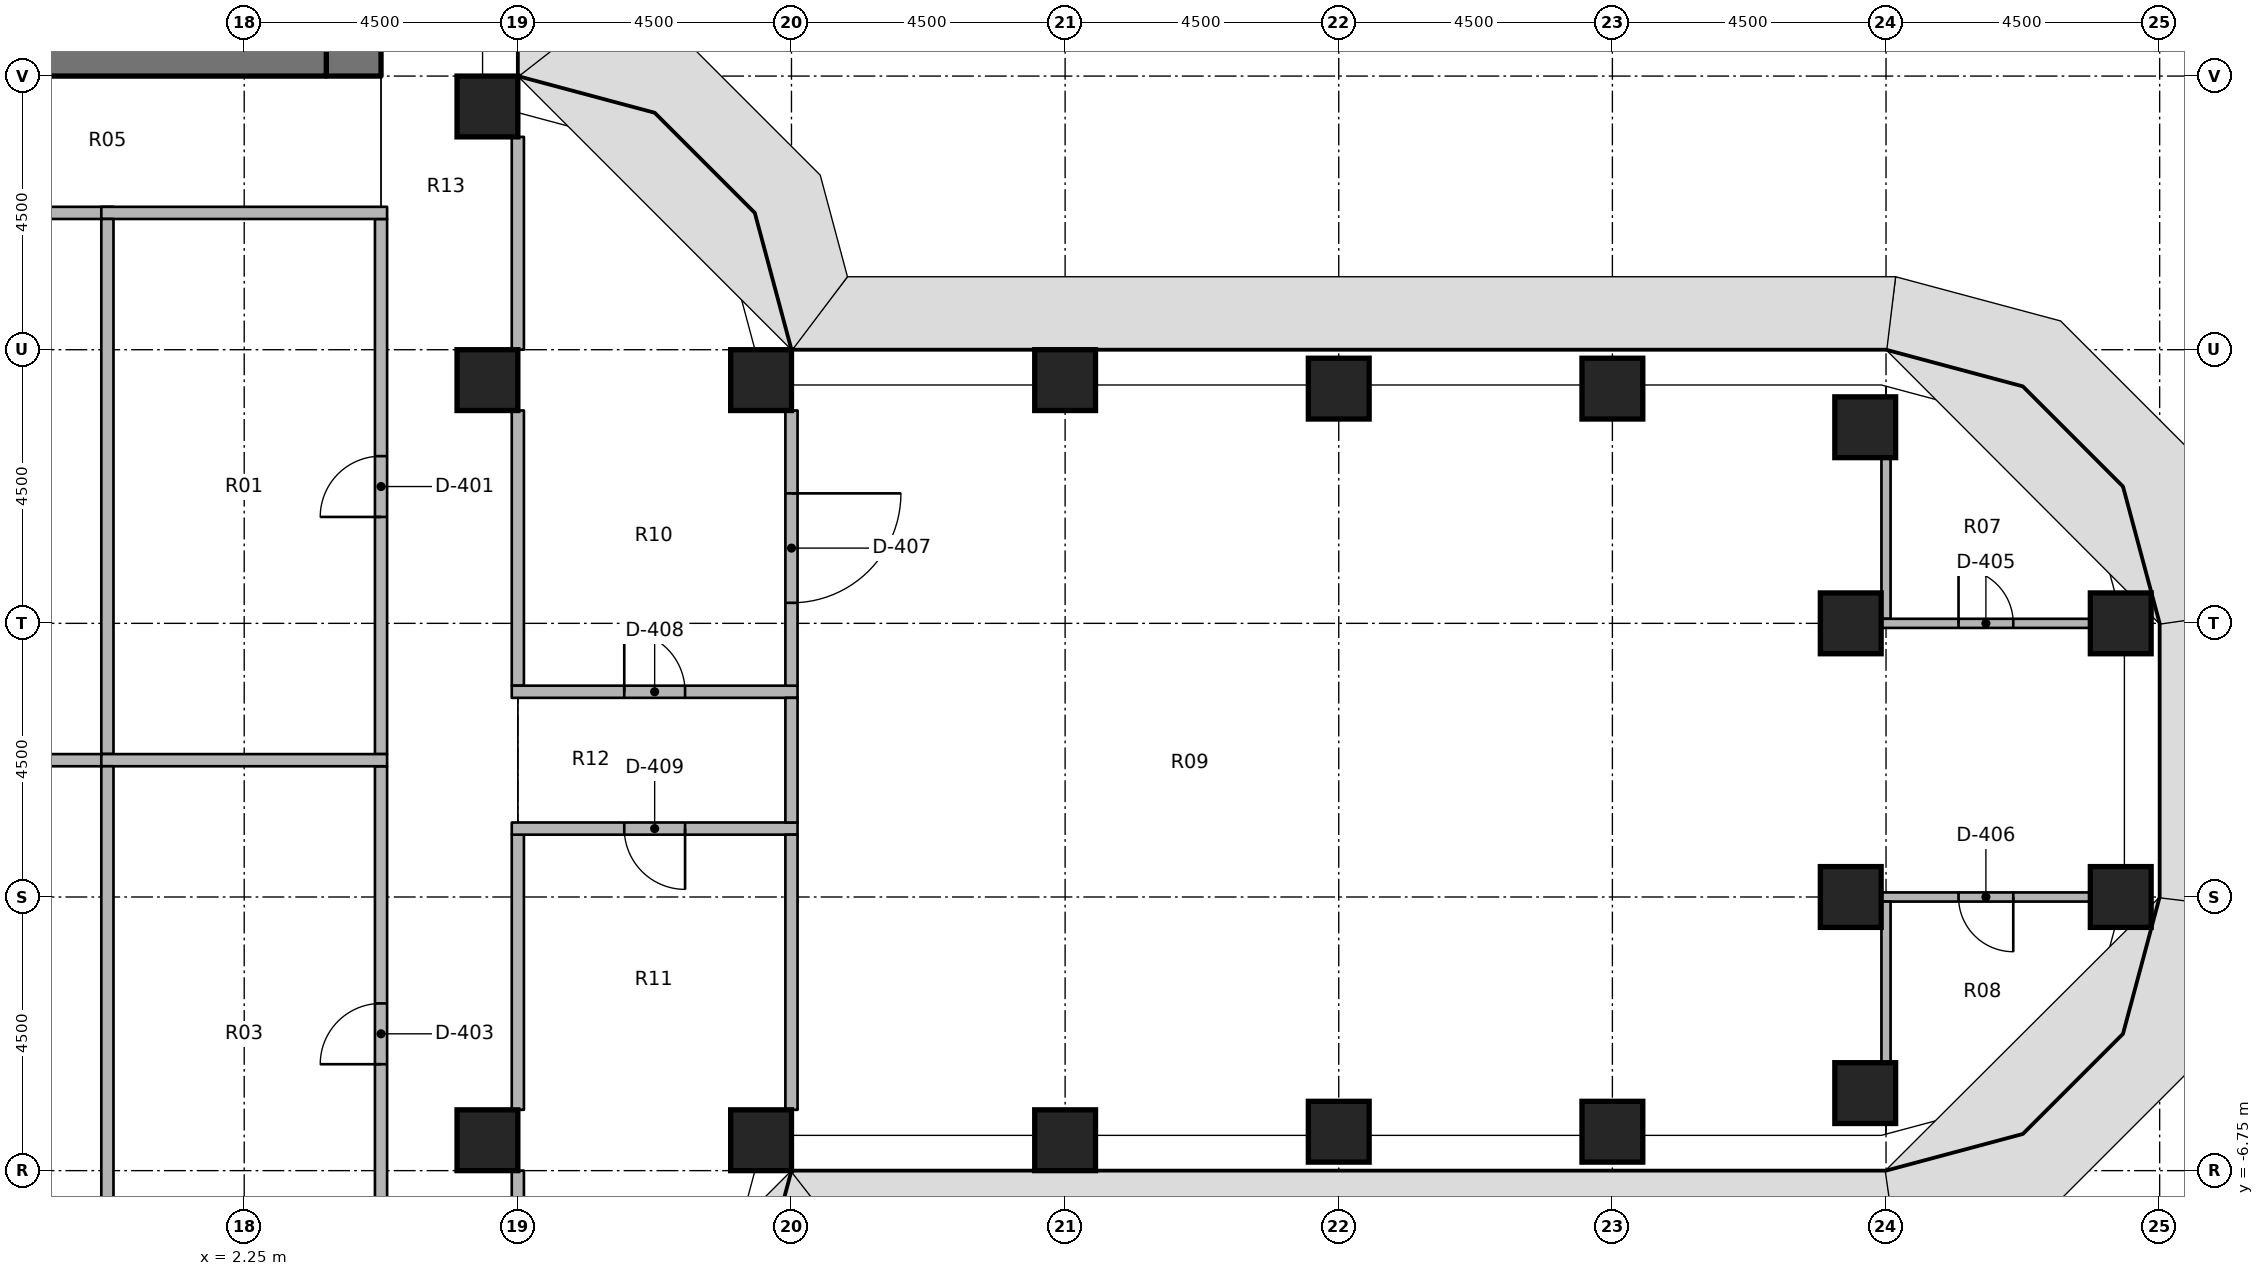
"""IFC4 building model, lengths in metres.
Left out: names, types, materials, properties, quantities, classifications, styles, units other than length and angle.
Written with IfcOpenShell. Run it as: python <this file> out.ifc"""

import sys

from ifc_helpers import new_model, si_unit, direction, frame, frame_2d, origin, origin_2d, place, context, subcontext, project, spatial, rectangle, extrude, element, fill, save


model = new_model("IFC4")
c1 = context("Model", 3, precision=1e-05, world=origin(), true_north=direction((0.0, 1.0)))
c2 = subcontext(c1, "Body", "Model", "MODEL_VIEW")
j1 = project(units=[si_unit("LENGTHUNIT", "METRE"), si_unit("PLANEANGLEUNIT", "RADIAN")], contexts=[c1])
p1 = place(None, origin())
s1 = spatial("IfcSite", under=j1, at=p1, CompositionType="ELEMENT")
p2 = place(p1, origin())
s2 = spatial("IfcBuilding", under=s1, at=p2, CompositionType="ELEMENT")
p3 = place(p2, frame((0.0, 0.0, 56.4)))
s3 = spatial("IfcBuildingStorey", under=s2, at=p3, CompositionType="ELEMENT", Elevation=56.4)
for number, where, z_axis, x_axis in (
    (1, (6.25, -6.25, 0.0), (0.0, 0.0, 1.0), (1.0, 0.0, 0.0)),
    (2, (6.25, 6.25, 0.0), (0.0, 0.0, 1.0), (1.0, 0.0, 0.0)),
    (3, (6.25, 10.75, 0.0), (0.0, 0.0, 1.0), (1.0, 0.0, 0.0)),
    (4, (10.75, -6.25, 0.0), (0.0, 0.0, 1.0), (1.0, 0.0, 0.0)),
    (5, (10.75, 6.25, 0.0), (0.0, 0.0, 1.0), (1.0, 0.0, 0.0)),
    (6, (15.75, -6.25, 0.0), (0.0, 0.0, 1.0), (1.0, 0.0, 0.0)),
    (7, (15.75, 6.25, 0.0), (0.0, 0.0, 1.0), (1.0, 0.0, 0.0)),
    (8, (20.25, -6.11, 0.0), (0.0, 0.0, 1.0), (1.0, 0.0, 0.0)),
    (9, (20.25, 6.11, 0.0), (0.0, 0.0, 1.0), (1.0, 0.0, 0.0)),
    (10, (24.75, -6.11, 0.0), (0.0, 0.0, 1.0), (1.0, 0.0, 0.0)),
    (11, (24.75, 6.11, 0.0), (0.0, 0.0, 1.0), (1.0, 0.0, 0.0)),
    (12, (28.908, -5.475, 0.0), (0.0, 0.0, 1.0), (1.0, 0.0, 0.0)),
    (13, (28.67, -2.25, 0.0), (0.0, 0.0, 1.0), (1.0, 0.0, 0.0)),
    (14, (28.67, 2.25, 0.0), (0.0, 0.0, 1.0), (1.0, 0.0, 0.0)),
    (15, (28.908, 5.475, 0.0), (0.0, 0.0, 1.0), (1.0, 0.0, 0.0)),
    (16, (33.11, -2.25, 0.0), (0.0, 0.0, 1.0), (1.0, 0.0, 0.0)),
    (17, (33.11, 2.25, 0.0), (0.0, 0.0, 1.0), (1.0, 0.0, 0.0)),
):
    element("IfcColumn", number, at=place(p3, frame(where, z_axis=z_axis, x_axis=x_axis)), inside=s3, PredefinedType="COLUMN", context=c2, shape_type="SweptSolid", body=[
        extrude(rectangle(XDim=1.0, YDim=1.0, at=origin_2d()), origin(), (0.0, 0.0, 1.0), 4.05),
    ])
p4 = place(p3, frame((4.05, 11.25, 0.0), z_axis=(0.0, 0.0, 1.0), x_axis=(0.0, 1.0, 0.0)))
e18 = element("IfcWall", 18, at=p4, inside=s3, PredefinedType="SHEAR", context=c2, shape_type="SweptSolid", body=[
    extrude(rectangle(XDim=15.0, YDim=0.9, at=frame_2d((7.5, 0.0))), origin(), (0.0, 0.0, 1.0), 4.2),
])
p5 = place(p4, frame((7.15, 0.0, 0.0)))
e19 = element("IfcOpeningElement", 19, at=p5, cuts=e18, PredefinedType="OPENING", context=c2, shape_type="SweptSolid", body=[
    extrude(rectangle(XDim=1.5, YDim=2.3, at=frame_2d((0.75, 1.15))), frame((0.0, 0.46, 0.0), z_axis=(0.0, -1.0, 0.0), x_axis=(1.0, 0.0, 0.0)), (0.0, 0.0, 1.0), 0.92),
])
p6 = place(p4, frame((5.55, 0.0, 0.0)))
e20 = element("IfcOpeningElement", 20, at=p6, cuts=e18, PredefinedType="OPENING", context=c2, shape_type="SweptSolid", body=[
    extrude(rectangle(XDim=1.2, YDim=2.1, at=frame_2d((0.6, 1.05))), frame((0.0, 0.46, 0.0), z_axis=(0.0, -1.0, 0.0), x_axis=(1.0, 0.0, 0.0)), (0.0, 0.0, 1.0), 0.92),
])
p7 = place(p3, frame((-3.6, 11.7, 0.0), z_axis=(0.0, 0.0, 1.0), x_axis=(1.0, 0.0, 0.0)))
e21 = element("IfcWall", 21, at=p7, inside=s3, PredefinedType="SHEAR", context=c2, shape_type="SweptSolid", body=[
    extrude(rectangle(XDim=7.2, YDim=0.9, at=frame_2d((3.6, 0.0))), origin(), (0.0, 0.0, 1.0), 4.2),
])
p8 = place(p3, frame((4.5, 0.1, 0.0), z_axis=(0.0, 0.0, 1.0), x_axis=(0.0, 1.0, 0.0)))
e22 = element("IfcWall", 22, at=p8, inside=s3, PredefinedType="PARTITIONING", context=c2, shape_type="SweptSolid", body=[
    extrude(rectangle(XDim=8.8, YDim=0.2, at=frame_2d((4.4, 0.0))), origin(), (0.0, 0.0, 1.0), 3.131),
])
p9 = place(p8, frame((3.9, 0.0, 0.0)))
e23 = element("IfcOpeningElement", 23, at=p9, cuts=e22, PredefinedType="OPENING", context=c2, shape_type="SweptSolid", body=[
    extrude(rectangle(XDim=1.0, YDim=2.1, at=frame_2d((0.5, 1.05))), frame((0.0, 0.11, 0.0), z_axis=(0.0, -1.0, 0.0), x_axis=(1.0, 0.0, 0.0)), (0.0, 0.0, 1.0), 0.22),
])
p10 = place(p3, frame((4.5, -8.9, 0.0), z_axis=(0.0, 0.0, 1.0), x_axis=(0.0, 1.0, 0.0)))
e24 = element("IfcWall", 24, at=p10, inside=s3, PredefinedType="PARTITIONING", context=c2, shape_type="SweptSolid", body=[
    extrude(rectangle(XDim=8.8, YDim=0.2, at=frame_2d((4.4, 0.0))), origin(), (0.0, 0.0, 1.0), 3.131),
])
p11 = place(p10, frame((3.9, 0.0, 0.0)))
e25 = element("IfcOpeningElement", 25, at=p11, cuts=e24, PredefinedType="OPENING", context=c2, shape_type="SweptSolid", body=[
    extrude(rectangle(XDim=1.0, YDim=2.1, at=frame_2d((0.5, 1.05))), frame((0.0, 0.11, 0.0), z_axis=(0.0, -1.0, 0.0), x_axis=(1.0, 0.0, 0.0)), (0.0, 0.0, 1.0), 0.22),
])
p12 = place(p3, frame((6.75, 1.225, 0.0), z_axis=(0.0, 0.0, 1.0), x_axis=(0.0, 1.0, 0.0)))
e26 = element("IfcWall", 26, at=p12, inside=s3, PredefinedType="PARTITIONING", context=c2, shape_type="SweptSolid", body=[
    extrude(rectangle(XDim=4.525, YDim=0.2, at=frame_2d((2.262, 0.0))), origin(), (0.0, 0.0, 1.0), 3.131),
])
for number, where, z_axis, x_axis in (
    (27, (6.75, 6.75, 0.0), (0.0, 0.0, 1.0), (0.0, 1.0, 0.0)),
    (28, (6.75, -10.25, 0.0), (0.0, 0.0, 1.0), (0.0, 1.0, 0.0)),
):
    element("IfcWall", number, at=place(p3, frame(where, z_axis=z_axis, x_axis=x_axis)), inside=s3, PredefinedType="PARTITIONING", context=c2, shape_type="SweptSolid", body=[
        extrude(rectangle(XDim=3.5, YDim=0.2, at=frame_2d((1.75, 0.0))), origin(), (0.0, 0.0, 1.0), 3.131),
    ])
p13 = place(p3, frame((6.75, -5.75, 0.0), z_axis=(0.0, 0.0, 1.0), x_axis=(0.0, 1.0, 0.0)))
e29 = element("IfcWall", 29, at=p13, inside=s3, PredefinedType="PARTITIONING", context=c2, shape_type="SweptSolid", body=[
    extrude(rectangle(XDim=4.525, YDim=0.2, at=frame_2d((2.262, 0.0))), origin(), (0.0, 0.0, 1.0), 3.131),
])
for number, where, z_axis, x_axis in (
    (30, (-4.6, 9.0, 0.0), (0.0, 0.0, 1.0), (1.0, 0.0, 0.0)),
    (31, (-0.1, 9.0, 0.0), (0.0, 0.0, 1.0), (1.0, 0.0, 0.0)),
):
    element("IfcWall", number, at=place(p3, frame(where, z_axis=z_axis, x_axis=x_axis)), inside=s3, PredefinedType="PARTITIONING", context=c2, shape_type="SweptSolid", body=[
        extrude(rectangle(XDim=4.7, YDim=0.2, at=frame_2d((2.35, 0.0))), origin(), (0.0, 0.0, 1.0), 3.131),
    ])
p14 = place(p3, frame((0.0, 0.1, 0.0), z_axis=(0.0, 0.0, 1.0), x_axis=(0.0, 1.0, 0.0)))
e32 = element("IfcWall", 32, at=p14, inside=s3, PredefinedType="PARTITIONING", context=c2, shape_type="SweptSolid", body=[
    extrude(rectangle(XDim=8.8, YDim=0.2, at=frame_2d((4.4, 0.0))), origin(), (0.0, 0.0, 1.0), 3.131),
])
for number, where, z_axis, x_axis in (
    (33, (-4.6, 0.0, 0.0), (0.0, 0.0, 1.0), (1.0, 0.0, 0.0)),
    (34, (-0.1, 0.0, 0.0), (0.0, 0.0, 1.0), (1.0, 0.0, 0.0)),
):
    element("IfcWall", number, at=place(p3, frame(where, z_axis=z_axis, x_axis=x_axis)), inside=s3, PredefinedType="PARTITIONING", context=c2, shape_type="SweptSolid", body=[
        extrude(rectangle(XDim=4.7, YDim=0.2, at=frame_2d((2.35, 0.0))), origin(), (0.0, 0.0, 1.0), 3.131),
    ])
p15 = place(p3, frame((0.0, -8.9, 0.0), z_axis=(0.0, 0.0, 1.0), x_axis=(0.0, 1.0, 0.0)))
e35 = element("IfcWall", 35, at=p15, inside=s3, PredefinedType="PARTITIONING", context=c2, shape_type="SweptSolid", body=[
    extrude(rectangle(XDim=8.8, YDim=0.2, at=frame_2d((4.4, 0.0))), origin(), (0.0, 0.0, 1.0), 3.131),
])
p16 = place(p3, frame((6.65, 1.125, 0.0), z_axis=(0.0, 0.0, 1.0), x_axis=(1.0, 0.0, 0.0)))
e36 = element("IfcWall", 36, at=p16, inside=s3, PredefinedType="PARTITIONING", context=c2, shape_type="SweptSolid", body=[
    extrude(rectangle(XDim=4.7, YDim=0.2, at=frame_2d((2.35, 0.0))), origin(), (0.0, 0.0, 1.0), 3.131),
])
p17 = place(p16, frame((1.85, 0.0, 0.0)))
e37 = element("IfcOpeningElement", 37, at=p17, cuts=e36, PredefinedType="OPENING", context=c2, shape_type="SweptSolid", body=[
    extrude(rectangle(XDim=1.0, YDim=2.1, at=frame_2d((0.5, 1.05))), frame((0.0, 0.11, 0.0), z_axis=(0.0, -1.0, 0.0), x_axis=(1.0, 0.0, 0.0)), (0.0, 0.0, 1.0), 0.22),
])
p18 = place(p3, frame((11.35, -1.125, 0.0), z_axis=(0.0, 0.0, 1.0), x_axis=(-1.0, 0.0, 0.0)))
e38 = element("IfcWall", 38, at=p18, inside=s3, PredefinedType="PARTITIONING", context=c2, shape_type="SweptSolid", body=[
    extrude(rectangle(XDim=4.7, YDim=0.2, at=frame_2d((2.35, 0.0))), origin(), (0.0, 0.0, 1.0), 3.131),
])
p19 = place(p18, frame((1.85, 0.0, 0.0)))
e39 = element("IfcOpeningElement", 39, at=p19, cuts=e38, PredefinedType="OPENING", context=c2, shape_type="SweptSolid", body=[
    extrude(rectangle(XDim=1.0, YDim=2.1, at=frame_2d((0.5, 1.05))), frame((0.0, 0.11, 0.0), z_axis=(0.0, -1.0, 0.0), x_axis=(1.0, 0.0, 0.0)), (0.0, 0.0, 1.0), 0.22),
])
p20 = place(p3, frame((11.25, -1.025, 0.0), z_axis=(0.0, 0.0, 1.0), x_axis=(0.0, 1.0, 0.0)))
e40 = element("IfcWall", 40, at=p20, inside=s3, PredefinedType="PARTITIONING", context=c2, shape_type="SweptSolid", body=[
    extrude(rectangle(XDim=2.05, YDim=0.2, at=frame_2d((1.025, 0.0))), origin(), (0.0, 0.0, 1.0), 3.131),
])
p21 = place(p3, frame((11.25, 5.75, 0.0), z_axis=(0.0, 0.0, 1.0), x_axis=(0.0, -1.0, 0.0)))
e41 = element("IfcWall", 41, at=p21, inside=s3, PredefinedType="PARTITIONING", context=c2, shape_type="SweptSolid", body=[
    extrude(rectangle(XDim=4.525, YDim=0.2, at=frame_2d((2.262, 0.0))), origin(), (0.0, 0.0, 1.0), 3.131),
])
p22 = place(p21, frame((1.363, 0.0, 0.0)))
e42 = element("IfcOpeningElement", 42, at=p22, cuts=e41, PredefinedType="OPENING", context=c2, shape_type="SweptSolid", body=[
    extrude(rectangle(XDim=1.8, YDim=2.1, at=frame_2d((0.9, 1.05))), frame((0.0, 0.11, 0.0), z_axis=(0.0, -1.0, 0.0), x_axis=(1.0, 0.0, 0.0)), (0.0, 0.0, 1.0), 0.22),
])
p23 = place(p3, frame((11.25, -5.75, 0.0), z_axis=(0.0, 0.0, 1.0), x_axis=(0.0, 1.0, 0.0)))
e43 = element("IfcWall", 43, at=p23, inside=s3, PredefinedType="PARTITIONING", context=c2, shape_type="SweptSolid", body=[
    extrude(rectangle(XDim=4.525, YDim=0.2, at=frame_2d((2.262, 0.0))), origin(), (0.0, 0.0, 1.0), 3.131),
])
p24 = place(p3, frame((29.25, 2.325, 0.0), z_axis=(0.0, 0.0, 1.0), x_axis=(0.0, 1.0, 0.0)))
e44 = element("IfcWall", 44, at=p24, inside=s3, PredefinedType="PARTITIONING", context=c2, shape_type="SweptSolid", body=[
    extrude(rectangle(XDim=2.65, YDim=0.15, at=frame_2d((1.325, 0.0))), origin(), (0.0, 0.0, 1.0), 3.131),
])
p25 = place(p3, frame((29.175, 2.25, 0.0), z_axis=(0.0, 0.0, 1.0), x_axis=(1.0, 0.0, 0.0)))
e45 = element("IfcWall", 45, at=p25, inside=s3, PredefinedType="PARTITIONING", context=c2, shape_type="SweptSolid", body=[
    extrude(rectangle(XDim=3.435, YDim=0.15, at=frame_2d((1.718, 0.0))), origin(), (0.0, 0.0, 1.0), 3.131),
])
p26 = place(p25, frame((1.268, 0.0, 0.0)))
e46 = element("IfcOpeningElement", 46, at=p26, cuts=e45, PredefinedType="OPENING", context=c2, shape_type="SweptSolid", body=[
    extrude(rectangle(XDim=0.9, YDim=2.1, at=frame_2d((0.45, 1.05))), frame((0.0, 0.085, 0.0), z_axis=(0.0, -1.0, 0.0), x_axis=(1.0, 0.0, 0.0)), (0.0, 0.0, 1.0), 0.17),
])
p27 = place(p3, frame((32.61, -2.25, 0.0), z_axis=(0.0, 0.0, 1.0), x_axis=(-1.0, 0.0, 0.0)))
e47 = element("IfcWall", 47, at=p27, inside=s3, PredefinedType="PARTITIONING", context=c2, shape_type="SweptSolid", body=[
    extrude(rectangle(XDim=3.435, YDim=0.15, at=frame_2d((1.718, 0.0))), origin(), (0.0, 0.0, 1.0), 3.131),
])
p28 = place(p27, frame((1.268, 0.0, 0.0)))
e48 = element("IfcOpeningElement", 48, at=p28, cuts=e47, PredefinedType="OPENING", context=c2, shape_type="SweptSolid", body=[
    extrude(rectangle(XDim=0.9, YDim=2.1, at=frame_2d((0.45, 1.05))), frame((0.0, 0.085, 0.0), z_axis=(0.0, -1.0, 0.0), x_axis=(1.0, 0.0, 0.0)), (0.0, 0.0, 1.0), 0.17),
])
p29 = place(p3, frame((29.25, -4.975, 0.0), z_axis=(0.0, 0.0, 1.0), x_axis=(0.0, 1.0, 0.0)))
e49 = element("IfcWall", 49, at=p29, inside=s3, PredefinedType="PARTITIONING", context=c2, shape_type="SweptSolid", body=[
    extrude(rectangle(XDim=2.65, YDim=0.15, at=frame_2d((1.325, 0.0))), origin(), (0.0, 0.0, 1.0), 3.131),
])
p30 = place(p9, origin())
e50 = element("IfcDoor", 50, at=p30, inside=s3, OperationType="SINGLE_SWING_RIGHT", PredefinedType="DOOR", context=c2, shape_type="SweptSolid", body=[
    extrude(rectangle(XDim=1.0, YDim=2.1, at=frame_2d((0.5, 1.05))), frame((0.0, 0.025, 0.0), z_axis=(0.0, -1.0, 0.0), x_axis=(1.0, 0.0, 0.0)), (0.0, 0.0, 1.0), 0.05),
])
fill(e23, e50)
p31 = place(p11, origin())
e51 = element("IfcDoor", 51, at=p31, inside=s3, OperationType="SINGLE_SWING_RIGHT", PredefinedType="DOOR", context=c2, shape_type="SweptSolid", body=[
    extrude(rectangle(XDim=1.0, YDim=2.1, at=frame_2d((0.5, 1.05))), frame((0.0, 0.025, 0.0), z_axis=(0.0, -1.0, 0.0), x_axis=(1.0, 0.0, 0.0)), (0.0, 0.0, 1.0), 0.05),
])
fill(e25, e51)
p32 = place(p26, origin())
e52 = element("IfcDoor", 52, at=p32, inside=s3, OperationType="SINGLE_SWING_LEFT", PredefinedType="DOOR", context=c2, shape_type="SweptSolid", body=[
    extrude(rectangle(XDim=0.9, YDim=2.1, at=frame_2d((0.45, 1.05))), frame((0.0, 0.025, 0.0), z_axis=(0.0, -1.0, 0.0), x_axis=(1.0, 0.0, 0.0)), (0.0, 0.0, 1.0), 0.05),
])
fill(e46, e52)
p33 = place(p28, origin())
e53 = element("IfcDoor", 53, at=p33, inside=s3, OperationType="SINGLE_SWING_RIGHT", PredefinedType="DOOR", context=c2, shape_type="SweptSolid", body=[
    extrude(rectangle(XDim=0.9, YDim=2.1, at=frame_2d((0.45, 1.05))), frame((0.0, 0.025, 0.0), z_axis=(0.0, -1.0, 0.0), x_axis=(1.0, 0.0, 0.0)), (0.0, 0.0, 1.0), 0.05),
])
fill(e48, e53)
p34 = place(p22, origin())
e54 = element("IfcDoor", 54, at=p34, inside=s3, OperationType="DOUBLE_DOOR_SINGLE_SWING", PredefinedType="DOOR", context=c2, shape_type="SweptSolid", body=[
    extrude(rectangle(XDim=1.8, YDim=2.1, at=frame_2d((0.9, 1.05))), frame((0.0, 0.025, 0.0), z_axis=(0.0, -1.0, 0.0), x_axis=(1.0, 0.0, 0.0)), (0.0, 0.0, 1.0), 0.05),
])
fill(e42, e54)
p35 = place(p17, origin())
e55 = element("IfcDoor", 55, at=p35, inside=s3, OperationType="SINGLE_SWING_RIGHT", PredefinedType="DOOR", context=c2, shape_type="SweptSolid", body=[
    extrude(rectangle(XDim=1.0, YDim=2.1, at=frame_2d((0.5, 1.05))), frame((0.0, 0.025, 0.0), z_axis=(0.0, -1.0, 0.0), x_axis=(1.0, 0.0, 0.0)), (0.0, 0.0, 1.0), 0.05),
])
fill(e37, e55)
p36 = place(p19, origin())
e56 = element("IfcDoor", 56, at=p36, inside=s3, OperationType="SINGLE_SWING_RIGHT", PredefinedType="DOOR", context=c2, shape_type="SweptSolid", body=[
    extrude(rectangle(XDim=1.0, YDim=2.1, at=frame_2d((0.5, 1.05))), frame((0.0, 0.025, 0.0), z_axis=(0.0, -1.0, 0.0), x_axis=(1.0, 0.0, 0.0)), (0.0, 0.0, 1.0), 0.05),
])
fill(e39, e56)
save(model, sys.argv[1])
